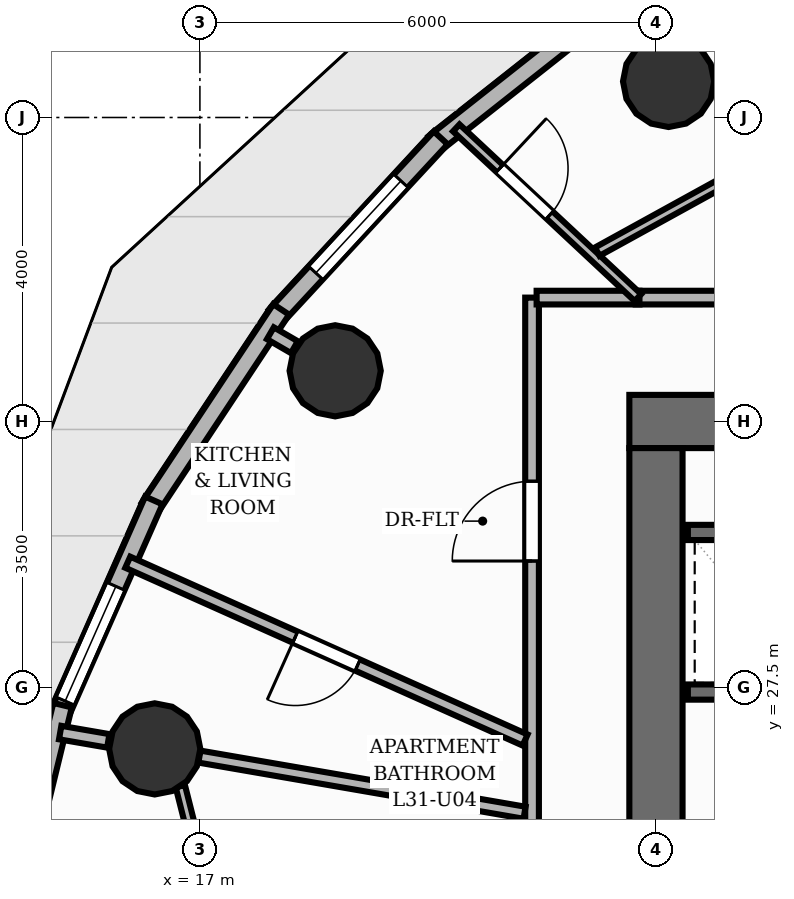
"""IFC4 building model, lengths in metres.
Left out: names, types, materials, properties, quantities, classifications, styles, units other than length and angle.
Written with IfcOpenShell. Run it as: python <this file> out.ifc"""

import sys

from ifc_helpers import new_model, si_unit, direction, frame, frame_2d, origin, origin_2d, place, context, subcontext, project, spatial, rectangle, circle, extrude, element, fill, save


model = new_model("IFC4")
c1 = context("Model", 3, precision=1e-05, world=origin(), true_north=direction((0.0, 1.0)))
c2 = subcontext(c1, "Body", "Model", "MODEL_VIEW")
j1 = project(units=[si_unit("LENGTHUNIT", "METRE"), si_unit("PLANEANGLEUNIT", "RADIAN")], contexts=[c1])
p1 = place(None, origin())
s1 = spatial("IfcSite", under=j1, at=p1, CompositionType="ELEMENT")
p2 = place(p1, origin())
s2 = spatial("IfcBuilding", under=s1, at=p2, CompositionType="ELEMENT")
p3 = place(p2, frame((0.0, 0.0, 106.08)))
s3 = spatial("IfcBuildingStorey", under=s2, at=p3, CompositionType="ELEMENT", Elevation=106.08)
p4 = place(p3, frame((22.65, 31.0, 0.0), z_axis=(0.0, 0.0, 1.0), x_axis=(1.0, 0.0, 0.0)))
e1 = element("IfcWall", 1, at=p4, inside=s3, PredefinedType="SHEAR", context=c2, shape_type="SweptSolid", body=[
    extrude(rectangle(XDim=18.7, YDim=0.7, at=frame_2d((9.35, 0.0))), origin(), (0.0, 0.0, 1.0), 3.2),
])
p5 = place(p4, frame((11.75, 0.0, 0.0)))
e2 = element("IfcOpeningElement", 2, at=p5, cuts=e1, PredefinedType="OPENING", context=c2, shape_type="SweptSolid", body=[
    extrude(rectangle(XDim=1.1, YDim=2.15, at=frame_2d((0.55, 1.075))), frame((0.0, 0.36, 0.0), z_axis=(0.0, -1.0, 0.0), x_axis=(1.0, 0.0, 0.0)), (0.0, 0.0, 1.0), 0.72),
])
p6 = place(p3, frame((23.0, 17.35, 0.0), z_axis=(0.0, 0.0, 1.0), x_axis=(0.0, 1.0, 0.0)))
e3 = element("IfcWall", 3, at=p6, inside=s3, PredefinedType="SHEAR", context=c2, shape_type="SweptSolid", body=[
    extrude(rectangle(XDim=13.3, YDim=0.7, at=frame_2d((6.65, 0.0))), origin(), (0.0, 0.0, 1.0), 3.2),
])
for number, where, z_axis, x_axis in (
    (4, (23.167, 35.474, 0.0), (0.0, 0.0, 1.0), (1.0, 0.0, 0.0)),
    (5, (18.78, 31.667, 0.0), (0.0, 0.0, 1.0), (1.0, 0.0, 0.0)),
    (6, (16.406, 26.692, 0.0), (0.0, 0.0, 1.0), (1.0, 0.0, 0.0)),
):
    element("IfcColumn", number, at=place(p3, frame(where, z_axis=z_axis, x_axis=x_axis)), inside=s3, PredefinedType="COLUMN", context=c2, shape_type="SweptSolid", body=[
        extrude(circle(Radius=0.6, at=origin_2d()), origin(), (0.0, 0.0, 1.0), 3.2),
    ])
p7 = place(p3, frame((20.088, 34.658, 0.0), z_axis=(0.0, 0.0, 1.0), x_axis=(0.784871179145, 0.619658964389, 0.0)))
e7 = element("IfcWall", 7, at=p7, inside=s3, PredefinedType="SOLIDWALL", context=c2, shape_type="SweptSolid", body=[
    extrude(rectangle(XDim=3.236, YDim=0.25, at=frame_2d((1.618, 0.0))), origin(), (0.0, 0.0, 1.0), 2.96),
])
p8 = place(p3, frame((18.001, 32.388, 0.0), z_axis=(0.0, 0.0, 1.0), x_axis=(0.678956449941, 0.734178547142, 0.0)))
e8 = element("IfcWall", 8, at=p8, inside=s3, PredefinedType="SOLIDWALL", context=c2, shape_type="SweptSolid", body=[
    extrude(rectangle(XDim=3.192, YDim=0.25, at=frame_2d((1.596, 0.0))), origin(), (0.0, 0.0, 1.0), 2.96),
])
p9 = place(p8, frame((0.771, 0.0, 0.85)))
e9 = element("IfcOpeningElement", 9, at=p9, cuts=e8, PredefinedType="OPENING", context=c2, shape_type="SweptSolid", body=[
    extrude(rectangle(XDim=1.65, YDim=1.55, at=frame_2d((0.825, 0.775))), frame((0.0, 0.135, 0.0), z_axis=(0.0, -1.0, 0.0), x_axis=(1.0, 0.0, 0.0)), (0.0, 0.0, 1.0), 0.27),
])
p10 = place(p3, frame((16.341, 29.864, 0.0), z_axis=(0.0, 0.0, 1.0), x_axis=(0.552034347266, 0.833821371421, 0.0)))
e10 = element("IfcWall", 10, at=p10, inside=s3, PredefinedType="SOLIDWALL", context=c2, shape_type="SweptSolid", body=[
    extrude(rectangle(XDim=3.131, YDim=0.25, at=frame_2d((1.565, 0.0))), origin(), (0.0, 0.0, 1.0), 2.96),
])
p11 = place(p3, frame((15.157, 27.162, 0.0), z_axis=(0.0, 0.0, 1.0), x_axis=(0.404109525311, 0.914710605357, 0.0)))
e11 = element("IfcWall", 11, at=p11, inside=s3, PredefinedType="SOLIDWALL", context=c2, shape_type="SweptSolid", body=[
    extrude(rectangle(XDim=3.061, YDim=0.25, at=frame_2d((1.53, 0.0))), origin(), (0.0, 0.0, 1.0), 2.96),
])
p12 = place(p11, frame((0.175, 0.0, 0.85)))
e12 = element("IfcOpeningElement", 12, at=p12, cuts=e11, PredefinedType="OPENING", context=c2, shape_type="SweptSolid", body=[
    extrude(rectangle(XDim=1.65, YDim=1.55, at=frame_2d((0.825, 0.775))), frame((0.0, 0.135, 0.0), z_axis=(0.0, -1.0, 0.0), x_axis=(1.0, 0.0, 0.0)), (0.0, 0.0, 1.0), 0.27),
])
p13 = place(p3, frame((14.486, 24.364, 0.0), z_axis=(0.0, 0.0, 1.0), x_axis=(0.236668427837, 0.971590477138, 0.0)))
e13 = element("IfcWall", 13, at=p13, inside=s3, PredefinedType="SOLIDWALL", context=c2, shape_type="SweptSolid", body=[
    extrude(rectangle(XDim=2.989, YDim=0.25, at=frame_2d((1.494, 0.0))), origin(), (0.0, 0.0, 1.0), 2.96),
])
for number, where, z_axis, x_axis in (
    (14, (23.42, 29.54, 0.0), (0.0, 0.0, 1.0), (1.0, 0.0, 0.0)),
    (15, (23.42, 27.44, 0.0), (0.0, 0.0, 1.0), (1.0, 0.0, 0.0)),
):
    element("IfcWall", number, at=place(p3, frame(where, z_axis=z_axis, x_axis=x_axis)), inside=s3, PredefinedType="SHEAR", context=c2, shape_type="SweptSolid", body=[
        extrude(rectangle(XDim=1.71, YDim=0.2, at=frame_2d((0.855, 0.0))), origin(), (0.0, 0.0, 1.0), 3.2),
    ])
p14 = place(p3, frame((18.243, 31.978, 0.0), z_axis=(0.0, 0.0, 1.0), x_axis=(-0.864891917132, 0.501958137377, 0.0)))
e16 = element("IfcWall", 16, at=p14, inside=s3, PredefinedType="PARTITIONING", context=c2, shape_type="SweptSolid", body=[
    extrude(rectangle(XDim=0.365, YDim=0.18, at=frame_2d((0.183, 0.0))), origin(), (0.0, 0.0, 1.0), 2.26),
])
p15 = place(p3, frame((15.794, 26.798, 0.0), z_axis=(0.0, 0.0, 1.0), x_axis=(-0.985389793052, 0.170314285219, 0.0)))
e17 = element("IfcWall", 17, at=p15, inside=s3, PredefinedType="PARTITIONING", context=c2, shape_type="SweptSolid", body=[
    extrude(rectangle(XDim=0.642, YDim=0.18, at=frame_2d((0.321, 0.0))), origin(), (0.0, 0.0, 1.0), 2.26),
])
p16 = place(p3, frame((22.734, 32.63, 0.0), z_axis=(0.0, 0.0, 1.0), x_axis=(1.0, 0.0, 0.0)))
e18 = element("IfcWall", 18, at=p16, inside=s3, PredefinedType="PARTITIONING", context=c2, shape_type="SweptSolid", body=[
    extrude(rectangle(XDim=19.896, YDim=0.18, at=frame_2d((9.948, 0.0))), origin(), (0.0, 0.0, 1.0), 2.955),
])
p17 = place(p16, frame((11.004, 0.0, 0.0)))
e19 = element("IfcOpeningElement", 19, at=p17, cuts=e18, PredefinedType="OPENING", context=c2, shape_type="SweptSolid", body=[
    extrude(rectangle(XDim=1.05, YDim=2.15, at=frame_2d((0.525, 1.075))), frame((0.0, 0.1, 0.0), z_axis=(0.0, -1.0, 0.0), x_axis=(1.0, 0.0, 0.0)), (0.0, 0.0, 1.0), 0.2),
])
p18 = place(p3, frame((21.37, 15.37, 0.0), z_axis=(0.0, 0.0, 1.0), x_axis=(0.0, 1.0, 0.0)))
e20 = element("IfcWall", 20, at=p18, inside=s3, PredefinedType="PARTITIONING", context=c2, shape_type="SweptSolid", body=[
    extrude(rectangle(XDim=17.26, YDim=0.18, at=frame_2d((8.63, 0.0))), origin(), (0.0, 0.0, 1.0), 2.955),
])
p19 = place(p18, frame((13.794, 0.0, 0.0)))
e21 = element("IfcOpeningElement", 21, at=p19, cuts=e20, PredefinedType="OPENING", context=c2, shape_type="SweptSolid", body=[
    extrude(rectangle(XDim=1.05, YDim=2.15, at=frame_2d((0.525, 1.075))), frame((0.0, 0.1, 0.0), z_axis=(0.0, -1.0, 0.0), x_axis=(1.0, 0.0, 0.0)), (0.0, 0.0, 1.0), 0.2),
])
p20 = place(p3, frame((21.43, 32.63, 0.0), z_axis=(0.0, 0.0, 1.0), x_axis=(1.0, 0.0, 0.0)))
e22 = element("IfcWall", 22, at=p20, inside=s3, PredefinedType="PARTITIONING", context=c2, shape_type="SweptSolid", body=[
    extrude(rectangle(XDim=1.353, YDim=0.18, at=frame_2d((0.677, 0.0))), origin(), (0.0, 0.0, 1.0), 2.955),
])
p21 = place(p3, frame((21.279, 26.809, 0.0), z_axis=(0.0, 0.0, 1.0), x_axis=(-0.912794415037, 0.408419338275, 0.0)))
e23 = element("IfcWall", 23, at=p21, inside=s3, PredefinedType="PLUMBINGWALL", context=c2, shape_type="SweptSolid", body=[
    extrude(rectangle(XDim=5.727, YDim=0.16, at=frame_2d((2.864, 0.0))), origin(), (0.0, 0.0, 1.0), 2.641),
])
p22 = place(p21, frame((2.414, 0.0, 0.0)))
e24 = element("IfcOpeningElement", 24, at=p22, cuts=e23, PredefinedType="OPENING", context=c2, shape_type="SweptSolid", body=[
    extrude(rectangle(XDim=0.9, YDim=2.1, at=frame_2d((0.45, 1.05))), frame((0.0, 0.09, 0.0), z_axis=(0.0, -1.0, 0.0), x_axis=(1.0, 0.0, 0.0)), (0.0, 0.0, 1.0), 0.18),
])
p23 = place(p3, frame((20.373, 34.863, 0.0), z_axis=(0.0, 0.0, 1.0), x_axis=(0.730692833249, -0.682706366924, 0.0)))
e25 = element("IfcWall", 25, at=p23, inside=s3, PredefinedType="PARTITIONING", context=c2, shape_type="SweptSolid", body=[
    extrude(rectangle(XDim=3.271, YDim=0.125, at=frame_2d((1.636, 0.0))), origin(), (0.0, 0.0, 1.0), 2.955),
])
p24 = place(p23, frame((0.781, 0.0, 0.0)))
e26 = element("IfcOpeningElement", 26, at=p24, cuts=e25, PredefinedType="OPENING", context=c2, shape_type="SweptSolid", body=[
    extrude(rectangle(XDim=0.9, YDim=2.1, at=frame_2d((0.45, 1.05))), frame((0.0, 0.073, 0.0), z_axis=(0.0, -1.0, 0.0), x_axis=(1.0, 0.0, 0.0)), (0.0, 0.0, 1.0), 0.145),
])
p25 = place(p3, frame((21.271, 25.852, 0.0), z_axis=(0.0, 0.0, 1.0), x_axis=(-0.985414949705, 0.170168671906, 0.0)))
e27 = element("IfcWall", 27, at=p25, inside=s3, PredefinedType="PLUMBINGWALL", context=c2, shape_type="SweptSolid", body=[
    extrude(rectangle(XDim=4.341, YDim=0.16, at=frame_2d((2.171, 0.0))), origin(), (0.0, 0.0, 1.0), 2.26),
])
p26 = place(p3, frame((28.894, 36.907, 0.0), z_axis=(0.0, 0.0, 1.0), x_axis=(-0.875900786778, -0.482491255591, 0.0)))
e28 = element("IfcWall", 28, at=p26, inside=s3, PredefinedType="PARTITIONING", context=c2, shape_type="SweptSolid", body=[
    extrude(rectangle(XDim=7.611, YDim=0.125, at=frame_2d((3.805, 0.0))), origin(), (0.0, 0.0, 1.0), 2.955),
])
p27 = place(p26, frame((3.355, 0.0, 0.0)))
e29 = element("IfcOpeningElement", 29, at=p27, cuts=e28, PredefinedType="OPENING", context=c2, shape_type="SweptSolid", body=[
    extrude(rectangle(XDim=0.9, YDim=2.1, at=frame_2d((0.45, 1.05))), frame((0.0, 0.073, 0.0), z_axis=(0.0, -1.0, 0.0), x_axis=(1.0, 0.0, 0.0)), (0.0, 0.0, 1.0), 0.145),
])
p28 = place(p3, frame((19.111, 16.826, 0.0), z_axis=(0.0, 0.0, 1.0), x_axis=(-0.244982180272, 0.969527581531, 0.0)))
e30 = element("IfcWall", 30, at=p28, inside=s3, PredefinedType="PARTITIONING", context=c2, shape_type="SweptSolid", body=[
    extrude(rectangle(XDim=9.671, YDim=0.125, at=frame_2d((4.835, 0.0))), origin(), (0.0, 0.0, 1.0), 2.955),
])
p29 = place(p28, frame((3.265, 0.0, 0.0)))
e31 = element("IfcOpeningElement", 31, at=p29, cuts=e30, PredefinedType="OPENING", context=c2, shape_type="SweptSolid", body=[
    extrude(rectangle(XDim=0.9, YDim=2.1, at=frame_2d((0.45, 1.05))), frame((0.0, 0.073, 0.0), z_axis=(0.0, -1.0, 0.0), x_axis=(1.0, 0.0, 0.0)), (0.0, 0.0, 1.0), 0.145),
])
p30 = place(p9, origin())
e32 = element("IfcWindow", 32, at=p30, inside=s3, PartitioningType="SINGLE_PANEL", PredefinedType="WINDOW", context=c2, shape_type="SweptSolid", body=[
    extrude(rectangle(XDim=1.65, YDim=1.55, at=frame_2d((0.825, 0.775))), frame((0.0, 0.03, 0.0), z_axis=(0.0, -1.0, 0.0), x_axis=(1.0, 0.0, 0.0)), (0.0, 0.0, 1.0), 0.06),
])
fill(e9, e32)
p31 = place(p12, origin())
e33 = element("IfcWindow", 33, at=p31, inside=s3, PartitioningType="SINGLE_PANEL", PredefinedType="WINDOW", context=c2, shape_type="SweptSolid", body=[
    extrude(rectangle(XDim=1.65, YDim=1.55, at=frame_2d((0.825, 0.775))), frame((0.0, 0.03, 0.0), z_axis=(0.0, -1.0, 0.0), x_axis=(1.0, 0.0, 0.0)), (0.0, 0.0, 1.0), 0.06),
])
fill(e12, e33)
p32 = place(p19, origin())
e34 = element("IfcDoor", 34, at=p32, inside=s3, OperationType="SINGLE_SWING_LEFT", PredefinedType="DOOR", context=c2, shape_type="SweptSolid", body=[
    extrude(rectangle(XDim=1.05, YDim=2.15, at=frame_2d((0.525, 1.075))), frame((0.0, 0.025, 0.0), z_axis=(0.0, -1.0, 0.0), x_axis=(1.0, 0.0, 0.0)), (0.0, 0.0, 1.0), 0.05),
])
fill(e21, e34)
p33 = place(p22, origin())
e35 = element("IfcDoor", 35, at=p33, inside=s3, OperationType="SINGLE_SWING_RIGHT", PredefinedType="DOOR", context=c2, shape_type="SweptSolid", body=[
    extrude(rectangle(XDim=0.9, YDim=2.1, at=frame_2d((0.45, 1.05))), frame((0.0, 0.025, 0.0), z_axis=(0.0, -1.0, 0.0), x_axis=(1.0, 0.0, 0.0)), (0.0, 0.0, 1.0), 0.05),
])
fill(e24, e35)
p34 = place(p24, origin())
e36 = element("IfcDoor", 36, at=p34, inside=s3, OperationType="SINGLE_SWING_LEFT", PredefinedType="DOOR", context=c2, shape_type="SweptSolid", body=[
    extrude(rectangle(XDim=0.9, YDim=2.1, at=frame_2d((0.45, 1.05))), frame((0.0, 0.025, 0.0), z_axis=(0.0, -1.0, 0.0), x_axis=(1.0, 0.0, 0.0)), (0.0, 0.0, 1.0), 0.05),
])
fill(e26, e36)
save(model, sys.argv[1])
